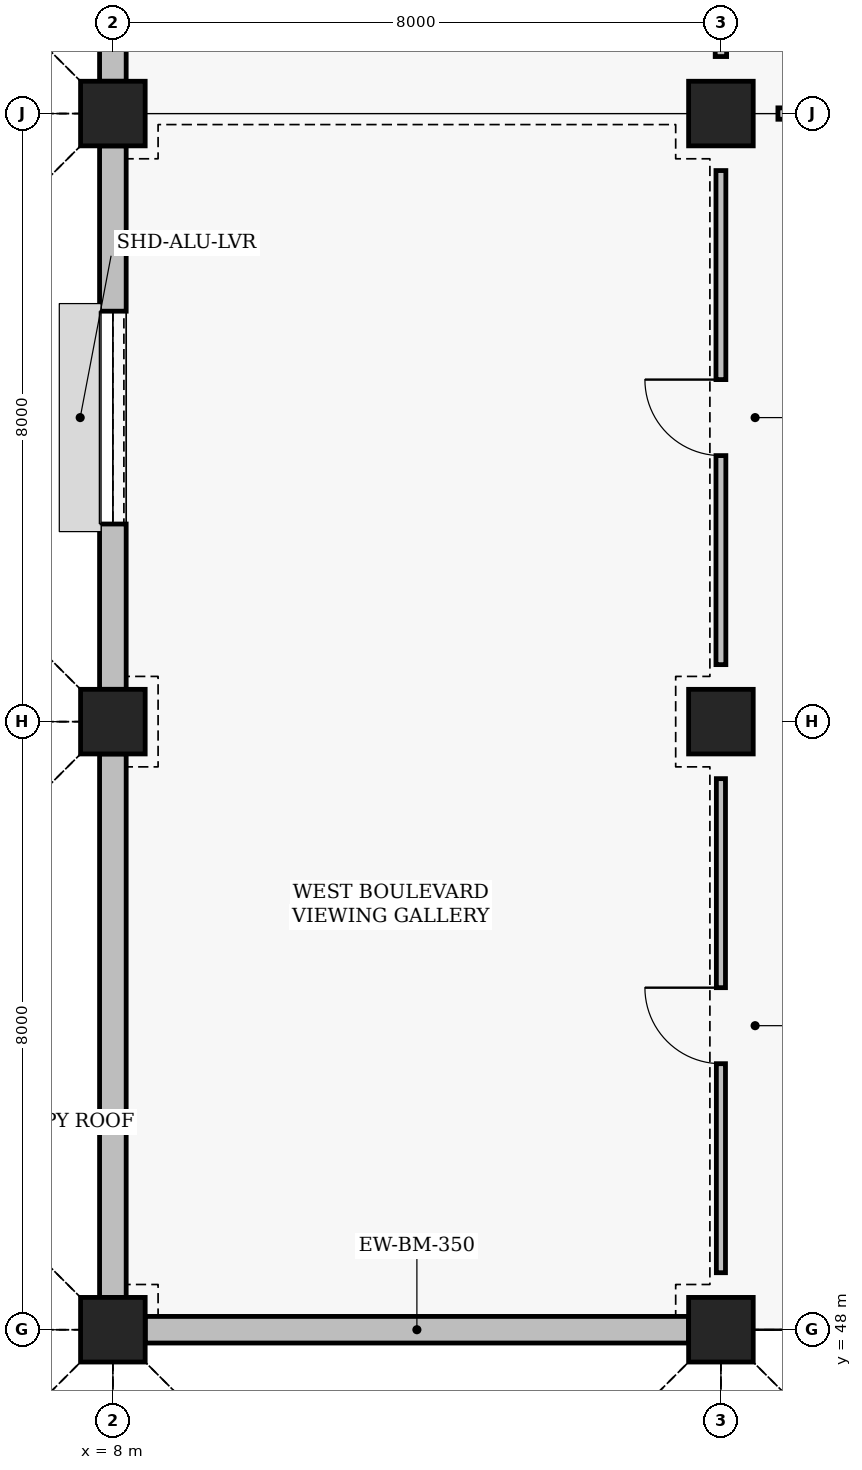
"""IFC4 building model, lengths in metres.
Left out: names, types, materials, properties, quantities, classifications, styles, units other than length and angle.
Written with IfcOpenShell. Run it as: python <this file> out.ifc"""

import sys

from ifc_helpers import new_model, si_unit, direction, frame, frame_2d, origin, origin_2d, place, context, subcontext, project, spatial, rectangle, circle, extrude, element, fill, save


model = new_model("IFC4")
c1 = context("Model", 3, precision=1e-05, world=origin(), true_north=direction((0.0, 1.0)))
c2 = subcontext(c1, "Body", "Model", "MODEL_VIEW")
j1 = project(units=[si_unit("LENGTHUNIT", "METRE"), si_unit("PLANEANGLEUNIT", "RADIAN")], contexts=[c1])
p1 = place(None, origin())
s1 = spatial("IfcSite", under=j1, at=p1, CompositionType="ELEMENT")
p2 = place(p1, origin())
s2 = spatial("IfcBuilding", under=s1, at=p2, CompositionType="ELEMENT")
p3 = place(p2, frame((0.0, 0.0, 9.6)))
s3 = spatial("IfcBuildingStorey", under=s2, at=p3, CompositionType="ELEMENT", Elevation=9.6)
for number, where, z_axis, x_axis in (
    (1, (8.0, 48.0, 0.0), (0.0, 0.0, 1.0), (1.0, 0.0, 0.0)),
    (2, (8.0, 56.0, 0.0), (0.0, 0.0, 1.0), (1.0, 0.0, 0.0)),
    (3, (8.0, 64.0, 0.0), (0.0, 0.0, 1.0), (1.0, 0.0, 0.0)),
    (4, (16.0, 48.0, 0.0), (0.0, 0.0, 1.0), (1.0, 0.0, 0.0)),
    (5, (16.0, 56.0, 0.0), (0.0, 0.0, 1.0), (1.0, 0.0, 0.0)),
    (6, (16.0, 64.0, 0.0), (0.0, 0.0, 1.0), (1.0, 0.0, 0.0)),
):
    element("IfcColumn", number, at=place(p3, frame(where, z_axis=z_axis, x_axis=x_axis)), inside=s3, PredefinedType="COLUMN", context=c2, shape_type="SweptSolid", body=[
        extrude(circle(Radius=0.425, at=origin_2d()), origin(), (0.0, 0.0, 1.0), 4.8),
    ])
p4 = place(p3, frame((8.425, 48.0, 0.0), z_axis=(0.0, 0.0, 1.0), x_axis=(1.0, 0.0, 0.0)))
e7 = element("IfcWall", 7, at=p4, inside=s3, PredefinedType="SOLIDWALL", context=c2, shape_type="SweptSolid", body=[
    extrude(rectangle(XDim=7.15, YDim=0.35, at=frame_2d((3.575, 0.0))), origin(), (0.0, 0.0, 1.0), 3.95),
])
p5 = place(p3, frame((8.0, 48.425, 0.0), z_axis=(0.0, 0.0, 1.0), x_axis=(0.0, 1.0, 0.0)))
e8 = element("IfcWall", 8, at=p5, inside=s3, PredefinedType="SOLIDWALL", context=c2, shape_type="SweptSolid", body=[
    extrude(rectangle(XDim=7.15, YDim=0.35, at=frame_2d((3.575, 0.0))), origin(), (0.0, 0.0, 1.0), 3.72),
])
p6 = place(p3, frame((8.0, 56.425, 0.0), z_axis=(0.0, 0.0, 1.0), x_axis=(0.0, 1.0, 0.0)))
e9 = element("IfcWall", 9, at=p6, inside=s3, PredefinedType="SOLIDWALL", context=c2, shape_type="SweptSolid", body=[
    extrude(rectangle(XDim=7.15, YDim=0.35, at=frame_2d((3.575, 0.0))), origin(), (0.0, 0.0, 1.0), 3.72),
])
p7 = place(p6, frame((2.175, 0.0, 1.9)))
e10 = element("IfcOpeningElement", 10, at=p7, cuts=e9, PredefinedType="OPENING", context=c2, shape_type="SweptSolid", body=[
    extrude(rectangle(XDim=2.8, YDim=1.1, at=frame_2d((1.4, 0.55))), frame((0.0, 0.185, 0.0), z_axis=(0.0, -1.0, 0.0), x_axis=(1.0, 0.0, 0.0)), (0.0, 0.0, 1.0), 0.37),
])
p8 = place(p3, frame((8.0, 64.425, 0.0), z_axis=(0.0, 0.0, 1.0), x_axis=(0.0, 1.0, 0.0)))
e11 = element("IfcWall", 11, at=p8, inside=s3, PredefinedType="SOLIDWALL", context=c2, shape_type="SweptSolid", body=[
    extrude(rectangle(XDim=7.15, YDim=0.35, at=frame_2d((3.575, 0.0))), origin(), (0.0, 0.0, 1.0), 3.95),
])
p9 = place(p3, frame((16.0, 48.75, 0.0), z_axis=(0.0, 0.0, 1.0), x_axis=(0.0, 1.0, 0.0)))
e12 = element("IfcWall", 12, at=p9, inside=s3, PredefinedType="PARTITIONING", context=c2, shape_type="SweptSolid", body=[
    extrude(rectangle(XDim=6.5, YDim=0.12, at=frame_2d((3.25, 0.0))), origin(), (0.0, 0.0, 1.0), 3.97),
])
p10 = place(p9, frame((2.75, 0.0, 0.0)))
e13 = element("IfcOpeningElement", 13, at=p10, cuts=e12, PredefinedType="OPENING", context=c2, shape_type="SweptSolid", body=[
    extrude(rectangle(XDim=1.0, YDim=2.1, at=frame_2d((0.5, 1.05))), frame((0.0, 0.07, 0.0), z_axis=(0.0, -1.0, 0.0), x_axis=(1.0, 0.0, 0.0)), (0.0, 0.0, 1.0), 0.14),
])
p11 = place(p3, frame((16.0, 64.75, 0.0), z_axis=(0.0, 0.0, 1.0), x_axis=(0.0, 1.0, 0.0)))
e14 = element("IfcWall", 14, at=p11, inside=s3, PredefinedType="PARTITIONING", context=c2, shape_type="SweptSolid", body=[
    extrude(rectangle(XDim=6.5, YDim=0.15, at=frame_2d((3.25, 0.0))), origin(), (0.0, 0.0, 1.0), 3.97),
])
p12 = place(p11, frame((2.675, 0.0, 0.0)))
e15 = element("IfcOpeningElement", 15, at=p12, cuts=e14, PredefinedType="OPENING", context=c2, shape_type="SweptSolid", body=[
    extrude(rectangle(XDim=1.15, YDim=2.15, at=frame_2d((0.575, 1.075))), frame((0.0, 0.085, 0.0), z_axis=(0.0, -1.0, 0.0), x_axis=(1.0, 0.0, 0.0)), (0.0, 0.0, 1.0), 0.17),
])
p13 = place(p3, frame((16.0, 56.75, 0.0), z_axis=(0.0, 0.0, 1.0), x_axis=(0.0, 1.0, 0.0)))
e16 = element("IfcWall", 16, at=p13, inside=s3, PredefinedType="PARTITIONING", context=c2, shape_type="SweptSolid", body=[
    extrude(rectangle(XDim=6.5, YDim=0.13, at=frame_2d((3.25, 0.0))), origin(), (0.0, 0.0, 1.0), 3.97),
])
p14 = place(p13, frame((2.75, 0.0, 0.0)))
e17 = element("IfcOpeningElement", 17, at=p14, cuts=e16, PredefinedType="OPENING", context=c2, shape_type="SweptSolid", body=[
    extrude(rectangle(XDim=1.0, YDim=2.1, at=frame_2d((0.5, 1.05))), frame((0.0, 0.075, 0.0), z_axis=(0.0, -1.0, 0.0), x_axis=(1.0, 0.0, 0.0)), (0.0, 0.0, 1.0), 0.15),
])
p15 = place(p3, frame((16.75, 64.0, 0.0), z_axis=(0.0, 0.0, 1.0), x_axis=(1.0, 0.0, 0.0)))
e18 = element("IfcWall", 18, at=p15, inside=s3, PredefinedType="PARTITIONING", context=c2, shape_type="SweptSolid", body=[
    extrude(rectangle(XDim=6.5, YDim=0.15, at=frame_2d((3.25, 0.0))), origin(), (0.0, 0.0, 1.0), 3.97),
])
p16 = place(p15, frame((2.675, 0.0, 0.0)))
e19 = element("IfcOpeningElement", 19, at=p16, cuts=e18, PredefinedType="OPENING", context=c2, shape_type="SweptSolid", body=[
    extrude(rectangle(XDim=1.15, YDim=2.15, at=frame_2d((0.575, 1.075))), frame((0.0, 0.085, 0.0), z_axis=(0.0, -1.0, 0.0), x_axis=(1.0, 0.0, 0.0)), (0.0, 0.0, 1.0), 0.17),
])
p17 = place(p7, origin())
e20 = element("IfcWindow", 20, at=p17, inside=s3, PartitioningType="SINGLE_PANEL", PredefinedType="LIGHTDOME", context=c2, shape_type="SweptSolid", body=[
    extrude(rectangle(XDim=2.8, YDim=1.1, at=frame_2d((1.4, 0.55))), frame((0.0, 0.03, 0.0), z_axis=(0.0, -1.0, 0.0), x_axis=(1.0, 0.0, 0.0)), (0.0, 0.0, 1.0), 0.06),
])
fill(e10, e20)
p18 = place(p10, origin())
e21 = element("IfcDoor", 21, at=p18, inside=s3, OperationType="SINGLE_SWING_RIGHT", PredefinedType="DOOR", context=c2, shape_type="SweptSolid", body=[
    extrude(rectangle(XDim=1.0, YDim=2.1, at=frame_2d((0.5, 1.05))), frame((0.0, 0.025, 0.0), z_axis=(0.0, -1.0, 0.0), x_axis=(1.0, 0.0, 0.0)), (0.0, 0.0, 1.0), 0.05),
])
fill(e13, e21)
p19 = place(p14, origin())
e22 = element("IfcDoor", 22, at=p19, inside=s3, OperationType="SINGLE_SWING_RIGHT", PredefinedType="DOOR", context=c2, shape_type="SweptSolid", body=[
    extrude(rectangle(XDim=1.0, YDim=2.1, at=frame_2d((0.5, 1.05))), frame((0.0, 0.025, 0.0), z_axis=(0.0, -1.0, 0.0), x_axis=(1.0, 0.0, 0.0)), (0.0, 0.0, 1.0), 0.05),
])
fill(e17, e22)
save(model, sys.argv[1])
